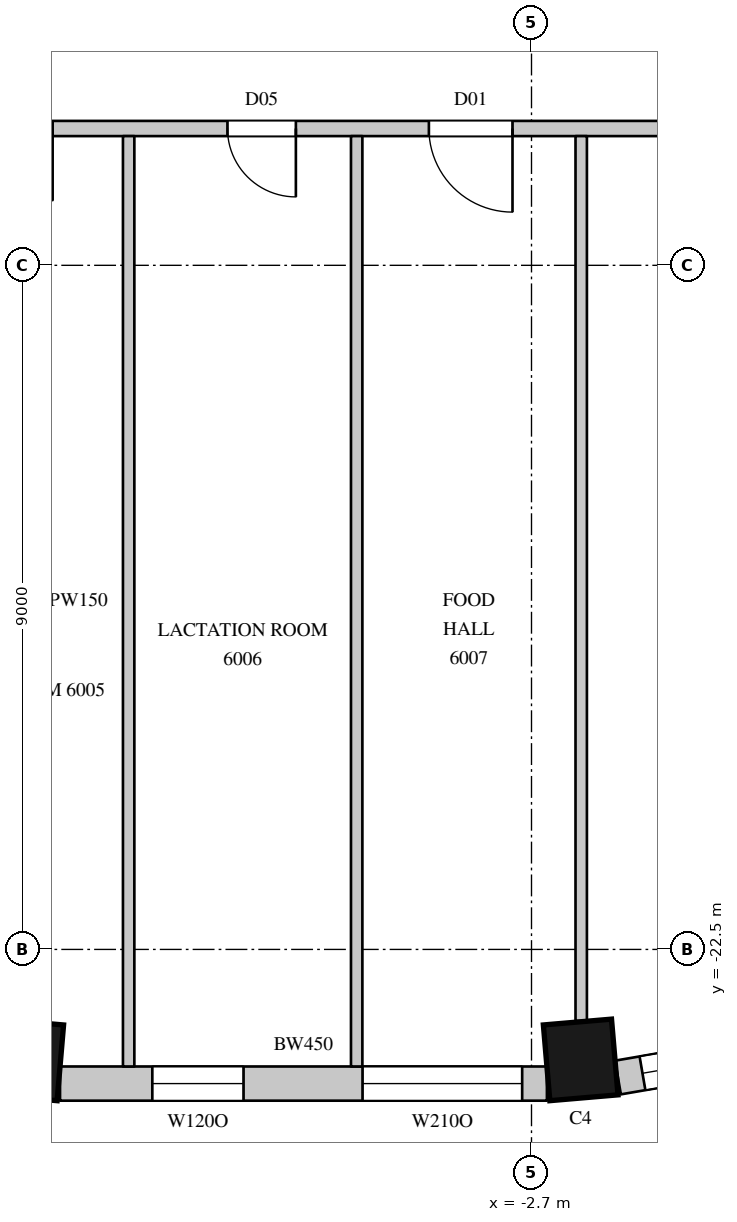
"""IFC4 building model, lengths in metres.
Left out: names, types, materials, properties, quantities, classifications, styles, units other than length and angle.
Written with IfcOpenShell. Run it as: python <this file> out.ifc"""

import sys

from ifc_helpers import new_model, si_unit, direction, frame, frame_2d, origin, origin_2d, place, context, subcontext, project, spatial, rectangle, extrude, element, fill, save


model = new_model("IFC4")
c1 = context("Model", 3, precision=1e-05, world=origin(), true_north=direction((0.0, 1.0)))
c2 = subcontext(c1, "Body", "Model", "MODEL_VIEW")
j1 = project(units=[si_unit("LENGTHUNIT", "METRE"), si_unit("PLANEANGLEUNIT", "RADIAN")], contexts=[c1])
p1 = place(None, origin())
s1 = spatial("IfcSite", under=j1, at=p1, CompositionType="ELEMENT")
p2 = place(p1, origin())
s2 = spatial("IfcBuilding", under=s1, at=p2, CompositionType="ELEMENT")
p3 = place(p2, frame((0.0, 0.0, 268.0)))
s3 = spatial("IfcBuildingStorey", under=s2, at=p3, CompositionType="ELEMENT", Elevation=268.0)
for number, where, z_axis, x_axis in (
    (1, (-9.347, -23.954, 0.0), (0.0, 0.0, 1.0), (0.996, -0.085, 0.0)),
    (2, (-2.053, -23.954, 0.0), (0.0, 0.0, 1.0), (0.996, 0.085, 0.0)),
):
    element("IfcColumn", number, at=place(p3, frame(where, z_axis=z_axis, x_axis=x_axis)), inside=s3, PredefinedType="COLUMN", context=c2, shape_type="SweptSolid", body=[
        extrude(rectangle(XDim=0.9, YDim=1.0, at=origin_2d()), origin(), (0.0, 0.0, 1.0), 4.1),
    ])
p4 = place(p3, frame((-8.903, -24.265, 0.0), z_axis=(0.0, 0.0, 1.0), x_axis=(1.0, 0.0, 0.0)))
e3 = element("IfcWall", 3, at=p4, inside=s3, PredefinedType="SOLIDWALL", context=c2, shape_type="SweptSolid", body=[
    extrude(rectangle(XDim=6.406, YDim=0.45, at=frame_2d((3.203, 0.0))), origin(), (0.0, 0.0, 1.0), 3.8),
])
p5 = place(p4, frame((3.98, 0.0, 1.05)))
e4 = element("IfcOpeningElement", 4, at=p5, cuts=e3, PredefinedType="OPENING", context=c2, shape_type="SweptSolid", body=[
    extrude(rectangle(XDim=2.1, YDim=2.4, at=frame_2d((1.05, 1.2))), frame((0.0, 0.235, 0.0), z_axis=(0.0, -1.0, 0.0), x_axis=(1.0, 0.0, 0.0)), (0.0, 0.0, 1.0), 0.47),
])
p6 = place(p4, frame((1.214, 0.0, 1.05)))
e5 = element("IfcOpeningElement", 5, at=p6, cuts=e3, PredefinedType="OPENING", context=c2, shape_type="SweptSolid", body=[
    extrude(rectangle(XDim=1.2, YDim=2.4, at=frame_2d((0.6, 1.2))), frame((0.0, 0.235, 0.0), z_axis=(0.0, -1.0, 0.0), x_axis=(1.0, 0.0, 0.0)), (0.0, 0.0, 1.0), 0.47),
])
p7 = place(p3, frame((-1.562, -24.185, 0.0), z_axis=(0.0, 0.0, 1.0), x_axis=(0.985502073964, 0.169663379113, 0.0)))
e6 = element("IfcWall", 6, at=p7, inside=s3, PredefinedType="SOLIDWALL", context=c2, shape_type="SweptSolid", body=[
    extrude(rectangle(XDim=6.412, YDim=0.45, at=frame_2d((3.206, 0.0))), origin(), (0.0, 0.0, 1.0), 3.8),
])
p8 = place(p7, frame((0.327, 0.0, 1.05)))
e7 = element("IfcOpeningElement", 7, at=p8, cuts=e6, PredefinedType="OPENING", context=c2, shape_type="SweptSolid", body=[
    extrude(rectangle(XDim=2.1, YDim=2.4, at=frame_2d((1.05, 1.2))), frame((0.0, 0.235, 0.0), z_axis=(0.0, -1.0, 0.0), x_axis=(1.0, 0.0, 0.0)), (0.0, 0.0, 1.0), 0.47),
])
p9 = place(p7, frame((3.985, 0.0, 1.05)))
e8 = element("IfcOpeningElement", 8, at=p9, cuts=e6, PredefinedType="OPENING", context=c2, shape_type="SweptSolid", body=[
    extrude(rectangle(XDim=2.1, YDim=2.4, at=frame_2d((1.05, 1.2))), frame((0.0, 0.235, 0.0), z_axis=(0.0, -1.0, 0.0), x_axis=(1.0, 0.0, 0.0)), (0.0, 0.0, 1.0), 0.47),
])
p10 = place(p3, frame((-10.9, -11.7, 0.0), z_axis=(0.0, 0.0, 1.0), x_axis=(1.0, 0.0, 0.0)))
e9 = element("IfcWall", 9, at=p10, inside=s3, PredefinedType="PARTITIONING", context=c2, shape_type="SweptSolid", body=[
    extrude(rectangle(XDim=21.5, YDim=0.2, at=frame_2d((10.75, 0.0))), origin(), (0.0, 0.0, 1.0), 3.8),
])
p11 = place(p10, frame((0.95, 0.0, 0.0)))
e10 = element("IfcOpeningElement", 10, at=p11, cuts=e9, PredefinedType="OPENING", context=c2, shape_type="SweptSolid", body=[
    extrude(rectangle(XDim=0.95, YDim=2.2, at=frame_2d((0.475, 1.1))), frame((0.0, 0.11, 0.0), z_axis=(0.0, -1.0, 0.0), x_axis=(1.0, 0.0, 0.0)), (0.0, 0.0, 1.0), 0.22),
])
p12 = place(p10, frame((4.2, 0.0, 0.0)))
e11 = element("IfcOpeningElement", 11, at=p12, cuts=e9, PredefinedType="OPENING", context=c2, shape_type="SweptSolid", body=[
    extrude(rectangle(XDim=0.9, YDim=2.2, at=frame_2d((0.45, 1.1))), frame((0.0, 0.11, 0.0), z_axis=(0.0, -1.0, 0.0), x_axis=(1.0, 0.0, 0.0)), (0.0, 0.0, 1.0), 0.22),
])
p13 = place(p10, frame((6.85, 0.0, 0.0)))
e12 = element("IfcOpeningElement", 12, at=p13, cuts=e9, PredefinedType="OPENING", context=c2, shape_type="SweptSolid", body=[
    extrude(rectangle(XDim=1.1, YDim=2.4, at=frame_2d((0.55, 1.2))), frame((0.0, 0.11, 0.0), z_axis=(0.0, -1.0, 0.0), x_axis=(1.0, 0.0, 0.0)), (0.0, 0.0, 1.0), 0.22),
])
p14 = place(p10, frame((9.95, 0.0, 0.0)))
e13 = element("IfcOpeningElement", 13, at=p14, cuts=e9, PredefinedType="OPENING", context=c2, shape_type="SweptSolid", body=[
    extrude(rectangle(XDim=1.1, YDim=2.4, at=frame_2d((0.55, 1.2))), frame((0.0, 0.11, 0.0), z_axis=(0.0, -1.0, 0.0), x_axis=(1.0, 0.0, 0.0)), (0.0, 0.0, 1.0), 0.22),
])
for number, where, z_axis, x_axis in (
    (14, (-8.0, -24.04, 0.0), (0.0, 0.0, 1.0), (0.0, 1.0, 0.0)),
    (15, (-5.0, -24.04, 0.0), (0.0, 0.0, 1.0), (0.0, 1.0, 0.0)),
):
    element("IfcWall", number, at=place(p3, frame(where, z_axis=z_axis, x_axis=x_axis)), inside=s3, PredefinedType="PARTITIONING", context=c2, shape_type="SweptSolid", body=[
        extrude(rectangle(XDim=12.24, YDim=0.15, at=frame_2d((6.12, 0.0))), origin(), (0.0, 0.0, 1.0), 3.8),
    ])
p15 = place(p3, frame((-2.046, -23.441, 0.0), z_axis=(0.0, 0.0, 1.0), x_axis=(0.0, 1.0, 0.0)))
e16 = element("IfcWall", 16, at=p15, inside=s3, PredefinedType="PARTITIONING", context=c2, shape_type="SweptSolid", body=[
    extrude(rectangle(XDim=11.641, YDim=0.15, at=frame_2d((5.821, 0.0))), origin(), (0.0, 0.0, 1.0), 3.8),
])
p16 = place(p5, origin())
e17 = element("IfcWindow", 17, at=p16, inside=s3, PartitioningType="SINGLE_PANEL", PredefinedType="WINDOW", context=c2, shape_type="SweptSolid", body=[
    extrude(rectangle(XDim=2.1, YDim=2.4, at=frame_2d((1.05, 1.2))), frame((0.0, 0.135, 0.0), z_axis=(0.0, -1.0, 0.0), x_axis=(1.0, 0.0, 0.0)), (0.0, 0.0, 1.0), 0.06),
])
fill(e4, e17)
p17 = place(p8, origin())
e18 = element("IfcWindow", 18, at=p17, inside=s3, PartitioningType="SINGLE_PANEL", PredefinedType="WINDOW", context=c2, shape_type="SweptSolid", body=[
    extrude(rectangle(XDim=2.1, YDim=2.4, at=frame_2d((1.05, 1.2))), frame((0.0, 0.135, 0.0), z_axis=(0.0, -1.0, 0.0), x_axis=(1.0, 0.0, 0.0)), (0.0, 0.0, 1.0), 0.06),
])
fill(e7, e18)
p18 = place(p11, origin())
e19 = element("IfcDoor", 19, at=p18, inside=s3, OperationType="SINGLE_SWING_LEFT", PredefinedType="DOOR", context=c2, shape_type="SweptSolid", body=[
    extrude(rectangle(XDim=0.95, YDim=2.2, at=frame_2d((0.475, 1.1))), frame((0.0, 0.025, 0.0), z_axis=(0.0, -1.0, 0.0), x_axis=(1.0, 0.0, 0.0)), (0.0, 0.0, 1.0), 0.05),
])
fill(e10, e19)
p19 = place(p12, origin())
e20 = element("IfcDoor", 20, at=p19, inside=s3, OperationType="SINGLE_SWING_LEFT", PredefinedType="DOOR", context=c2, shape_type="SweptSolid", body=[
    extrude(rectangle(XDim=0.9, YDim=2.2, at=frame_2d((0.45, 1.1))), frame((0.0, 0.025, 0.0), z_axis=(0.0, -1.0, 0.0), x_axis=(1.0, 0.0, 0.0)), (0.0, 0.0, 1.0), 0.05),
])
fill(e11, e20)
p20 = place(p13, origin())
e21 = element("IfcDoor", 21, at=p20, inside=s3, OperationType="SINGLE_SWING_LEFT", PredefinedType="DOOR", context=c2, shape_type="SweptSolid", body=[
    extrude(rectangle(XDim=1.1, YDim=2.4, at=frame_2d((0.55, 1.2))), frame((0.0, 0.025, 0.0), z_axis=(0.0, -1.0, 0.0), x_axis=(1.0, 0.0, 0.0)), (0.0, 0.0, 1.0), 0.05),
])
fill(e12, e21)
p21 = place(p6, origin())
e22 = element("IfcWindow", 22, at=p21, inside=s3, PartitioningType="SINGLE_PANEL", PredefinedType="WINDOW", context=c2, shape_type="SweptSolid", body=[
    extrude(rectangle(XDim=1.2, YDim=2.4, at=frame_2d((0.6, 1.2))), frame((0.0, 0.135, 0.0), z_axis=(0.0, -1.0, 0.0), x_axis=(1.0, 0.0, 0.0)), (0.0, 0.0, 1.0), 0.06),
])
fill(e5, e22)
save(model, sys.argv[1])
